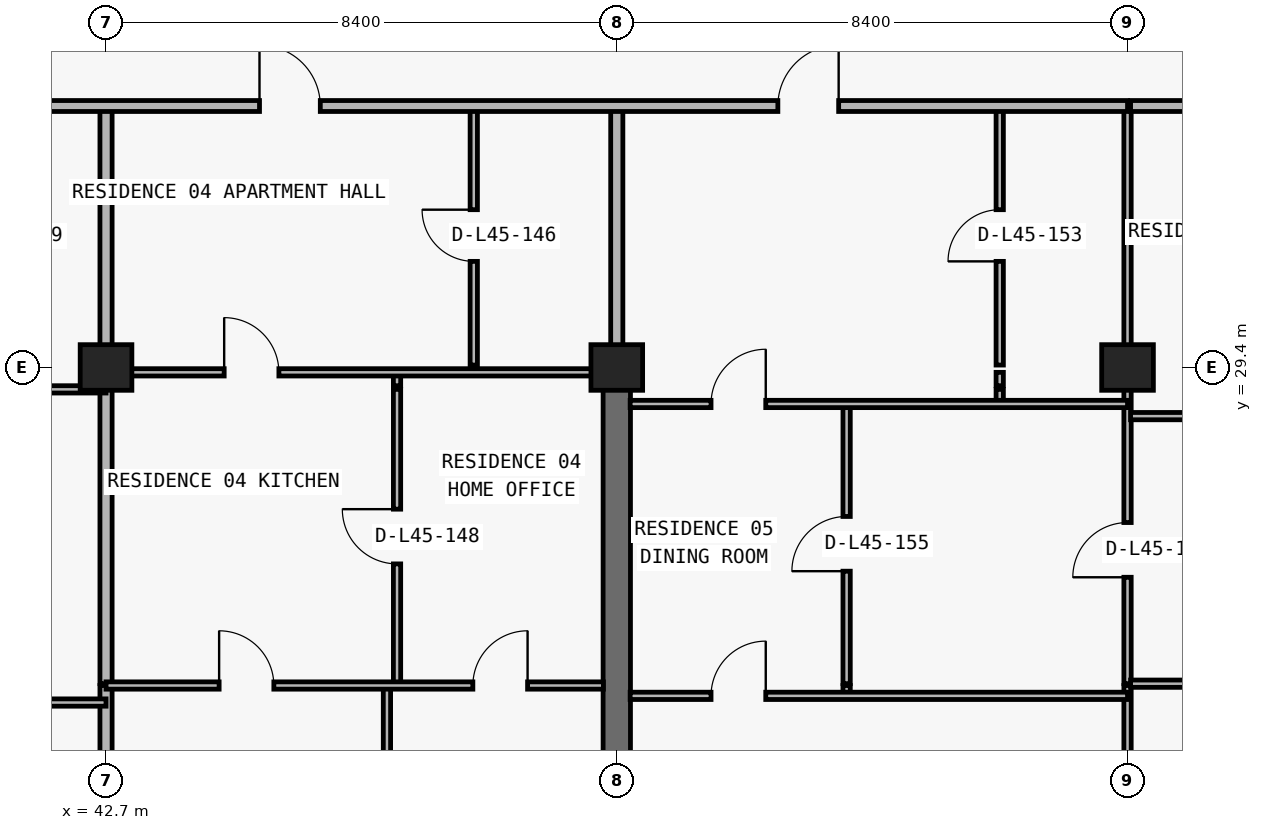
"""IFC4 building model, lengths in metres.
Left out: names, types, materials, properties, quantities, classifications, styles, units other than length and angle.
Written with IfcOpenShell. Run it as: python <this file> out.ifc"""

import sys

from ifc_helpers import new_model, si_unit, direction, frame, frame_2d, origin, origin_2d, place, context, subcontext, project, spatial, rectangle, extrude, element, fill, save


model = new_model("IFC4")
c1 = context("Model", 3, precision=1e-05, world=origin(), true_north=direction((0.0, 1.0)))
c2 = subcontext(c1, "Body", "Model", "MODEL_VIEW")
j1 = project(units=[si_unit("LENGTHUNIT", "METRE"), si_unit("PLANEANGLEUNIT", "RADIAN")], contexts=[c1])
p1 = place(None, origin())
s1 = spatial("IfcSite", under=j1, at=p1, CompositionType="ELEMENT")
p2 = place(p1, origin())
s2 = spatial("IfcBuilding", under=s1, at=p2, CompositionType="ELEMENT")
p3 = place(p2, frame((0.0, 0.0, 163.8)))
s3 = spatial("IfcBuildingStorey", under=s2, at=p3, CompositionType="ELEMENT", Elevation=163.8)
for number, where, z_axis, x_axis in (
    (1, (42.7, 29.4, 0.0), (0.0, 0.0, 1.0), (1.0, 0.0, 0.0)),
    (2, (51.1, 29.4, 0.0), (0.0, 0.0, 1.0), (1.0, 0.0, 0.0)),
    (3, (59.5, 29.4, 0.0), (0.0, 0.0, 1.0), (1.0, 0.0, 0.0)),
):
    element("IfcColumn", number, at=place(p3, frame(where, z_axis=z_axis, x_axis=x_axis)), inside=s3, PredefinedType="COLUMN", context=c2, shape_type="SweptSolid", body=[
        extrude(rectangle(XDim=0.85, YDim=0.75, at=origin_2d()), origin(), (0.0, 0.0, 1.0), 3.05),
    ])
p4 = place(p3, frame((51.1, 20.8, 0.0), z_axis=(0.0, 0.0, 1.0), x_axis=(0.0, 1.0, 0.0)))
e4 = element("IfcWall", 4, at=p4, inside=s3, PredefinedType="SHEAR", context=c2, shape_type="SweptSolid", body=[
    extrude(rectangle(XDim=8.6, YDim=0.45, at=frame_2d((4.3, 0.0))), origin(), (0.0, 0.0, 1.0), 3.05),
])
p5 = place(p3, frame((42.7, 11.24, 0.0), z_axis=(0.0, 0.0, 1.0), x_axis=(0.0, 1.0, 0.0)))
e5 = element("IfcWall", 5, at=p5, inside=s3, PredefinedType="PARTITIONING", context=c2, shape_type="SweptSolid", body=[
    extrude(rectangle(XDim=12.93, YDim=0.2, at=frame_2d((6.465, 0.0))), origin(), (0.0, 0.0, 1.0), 2.263),
])
p6 = place(p3, frame((42.7, 24.2, 0.0), z_axis=(0.0, 0.0, 1.0), x_axis=(0.0, 1.0, 0.0)))
e6 = element("IfcWall", 6, at=p6, inside=s3, PredefinedType="PARTITIONING", context=c2, shape_type="SweptSolid", body=[
    extrude(rectangle(XDim=4.84, YDim=0.2, at=frame_2d((2.42, 0.0))), origin(), (0.0, 0.0, 1.0), 2.263),
])
p7 = place(p3, frame((42.7, 29.1, 0.0), z_axis=(0.0, 0.0, 1.0), x_axis=(0.0, 1.0, 0.0)))
e7 = element("IfcWall", 7, at=p7, inside=s3, PredefinedType="PARTITIONING", context=c2, shape_type="SweptSolid", body=[
    extrude(rectangle(XDim=0.22, YDim=0.2, at=frame_2d((0.11, 0.0))), origin(), (0.0, 0.0, 1.0), 3.05),
])
p8 = place(p3, frame((42.7, 29.44, 0.0), z_axis=(0.0, 0.0, 1.0), x_axis=(0.0, 1.0, 0.0)))
e8 = element("IfcWall", 8, at=p8, inside=s3, PredefinedType="PARTITIONING", context=c2, shape_type="SweptSolid", body=[
    extrude(rectangle(XDim=4.26, YDim=0.2, at=frame_2d((2.13, 0.0))), origin(), (0.0, 0.0, 1.0), 2.263),
])
p9 = place(p3, frame((47.32, 11.24, 0.0), z_axis=(0.0, 0.0, 1.0), x_axis=(0.0, 1.0, 0.0)))
e9 = element("IfcWall", 9, at=p9, inside=s3, PredefinedType="PARTITIONING", context=c2, shape_type="SweptSolid", body=[
    extrude(rectangle(XDim=12.93, YDim=0.12, at=frame_2d((6.465, 0.0))), origin(), (0.0, 0.0, 1.0), 3.05),
])
p10 = place(p3, frame((47.486, 24.2, 0.0), z_axis=(0.0, 0.0, 1.0), x_axis=(0.0, 1.0, 0.0)))
e10 = element("IfcWall", 10, at=p10, inside=s3, PredefinedType="PARTITIONING", context=c2, shape_type="SweptSolid", body=[
    extrude(rectangle(XDim=4.84, YDim=0.12, at=frame_2d((2.42, 0.0))), origin(), (0.0, 0.0, 1.0), 3.05),
])
p11 = place(p10, frame((1.97, 0.0, 0.0)))
e11 = element("IfcOpeningElement", 11, at=p11, cuts=e10, PredefinedType="OPENING", context=c2, shape_type="SweptSolid", body=[
    extrude(rectangle(XDim=0.9, YDim=2.15, at=frame_2d((0.45, 1.075))), frame((0.0, 0.07, 0.0), z_axis=(0.0, -1.0, 0.0), x_axis=(1.0, 0.0, 0.0)), (0.0, 0.0, 1.0), 0.14),
])
p12 = place(p3, frame((47.486, 29.1, 0.0), z_axis=(0.0, 0.0, 1.0), x_axis=(0.0, 1.0, 0.0)))
e12 = element("IfcWall", 12, at=p12, inside=s3, PredefinedType="PARTITIONING", context=c2, shape_type="SweptSolid", body=[
    extrude(rectangle(XDim=0.22, YDim=0.12, at=frame_2d((0.11, 0.0))), origin(), (0.0, 0.0, 1.0), 3.05),
])
p13 = place(p3, frame((48.748, 29.44, 0.0), z_axis=(0.0, 0.0, 1.0), x_axis=(0.0, 1.0, 0.0)))
e13 = element("IfcWall", 13, at=p13, inside=s3, PredefinedType="PARTITIONING", context=c2, shape_type="SweptSolid", body=[
    extrude(rectangle(XDim=4.26, YDim=0.12, at=frame_2d((2.13, 0.0))), origin(), (0.0, 0.0, 1.0), 3.05),
])
p14 = place(p13, frame((1.705, 0.0, 0.0)))
e14 = element("IfcOpeningElement", 14, at=p14, cuts=e13, PredefinedType="OPENING", context=c2, shape_type="SweptSolid", body=[
    extrude(rectangle(XDim=0.85, YDim=2.1, at=frame_2d((0.425, 1.05))), frame((0.0, 0.07, 0.0), z_axis=(0.0, -1.0, 0.0), x_axis=(1.0, 0.0, 0.0)), (0.0, 0.0, 1.0), 0.14),
])
p15 = place(p3, frame((51.1, 29.44, 0.0), z_axis=(0.0, 0.0, 1.0), x_axis=(0.0, 1.0, 0.0)))
e15 = element("IfcWall", 15, at=p15, inside=s3, PredefinedType="PARTITIONING", context=c2, shape_type="SweptSolid", body=[
    extrude(rectangle(XDim=4.26, YDim=0.2, at=frame_2d((2.13, 0.0))), origin(), (0.0, 0.0, 1.0), 2.335),
])
p16 = place(p3, frame((54.88, 24.0, 0.0), z_axis=(0.0, 0.0, 1.0), x_axis=(0.0, 1.0, 0.0)))
e16 = element("IfcWall", 16, at=p16, inside=s3, PredefinedType="PARTITIONING", context=c2, shape_type="SweptSolid", body=[
    extrude(rectangle(XDim=0.17, YDim=0.12, at=frame_2d((0.085, 0.0))), origin(), (0.0, 0.0, 1.0), 3.05),
])
p17 = place(p3, frame((54.88, 24.2, 0.0), z_axis=(0.0, 0.0, 1.0), x_axis=(0.0, 1.0, 0.0)))
e17 = element("IfcWall", 17, at=p17, inside=s3, PredefinedType="PARTITIONING", context=c2, shape_type="SweptSolid", body=[
    extrude(rectangle(XDim=4.6, YDim=0.12, at=frame_2d((2.3, 0.0))), origin(), (0.0, 0.0, 1.0), 3.05),
])
p18 = place(p17, frame((1.85, 0.0, 0.0)))
e18 = element("IfcOpeningElement", 18, at=p18, cuts=e17, PredefinedType="OPENING", context=c2, shape_type="SweptSolid", body=[
    extrude(rectangle(XDim=0.9, YDim=2.15, at=frame_2d((0.45, 1.075))), frame((0.0, 0.07, 0.0), z_axis=(0.0, -1.0, 0.0), x_axis=(1.0, 0.0, 0.0)), (0.0, 0.0, 1.0), 0.14),
])
p19 = place(p3, frame((57.398, 28.8, 0.0), z_axis=(0.0, 0.0, 1.0), x_axis=(0.0, 1.0, 0.0)))
e19 = element("IfcWall", 19, at=p19, inside=s3, PredefinedType="PARTITIONING", context=c2, shape_type="SweptSolid", body=[
    extrude(rectangle(XDim=0.24, YDim=0.12, at=frame_2d((0.12, 0.0))), origin(), (0.0, 0.0, 1.0), 2.725),
])
p20 = place(p3, frame((57.398, 29.1, 0.0), z_axis=(0.0, 0.0, 1.0), x_axis=(0.0, 1.0, 0.0)))
e20 = element("IfcWall", 20, at=p20, inside=s3, PredefinedType="PARTITIONING", context=c2, shape_type="SweptSolid", body=[
    extrude(rectangle(XDim=0.22, YDim=0.12, at=frame_2d((0.11, 0.0))), origin(), (0.0, 0.0, 1.0), 2.725),
])
p21 = place(p3, frame((57.398, 29.44, 0.0), z_axis=(0.0, 0.0, 1.0), x_axis=(0.0, 1.0, 0.0)))
e21 = element("IfcWall", 21, at=p21, inside=s3, PredefinedType="PARTITIONING", context=c2, shape_type="SweptSolid", body=[
    extrude(rectangle(XDim=4.26, YDim=0.12, at=frame_2d((2.13, 0.0))), origin(), (0.0, 0.0, 1.0), 3.05),
])
p22 = place(p21, frame((1.705, 0.0, 0.0)))
e22 = element("IfcOpeningElement", 22, at=p22, cuts=e21, PredefinedType="OPENING", context=c2, shape_type="SweptSolid", body=[
    extrude(rectangle(XDim=0.85, YDim=2.1, at=frame_2d((0.425, 1.05))), frame((0.0, 0.07, 0.0), z_axis=(0.0, -1.0, 0.0), x_axis=(1.0, 0.0, 0.0)), (0.0, 0.0, 1.0), 0.14),
])
p23 = place(p3, frame((59.5, 11.24, 0.0), z_axis=(0.0, 0.0, 1.0), x_axis=(0.0, 1.0, 0.0)))
e23 = element("IfcWall", 23, at=p23, inside=s3, PredefinedType="PARTITIONING", context=c2, shape_type="SweptSolid", body=[
    extrude(rectangle(XDim=12.93, YDim=0.12, at=frame_2d((6.465, 0.0))), origin(), (0.0, 0.0, 1.0), 2.263),
])
p24 = place(p3, frame((59.5, 24.2, 0.0), z_axis=(0.0, 0.0, 1.0), x_axis=(0.0, 1.0, 0.0)))
e24 = element("IfcWall", 24, at=p24, inside=s3, PredefinedType="PARTITIONING", context=c2, shape_type="SweptSolid", body=[
    extrude(rectangle(XDim=4.84, YDim=0.12, at=frame_2d((2.42, 0.0))), origin(), (0.0, 0.0, 1.0), 2.263),
])
p25 = place(p24, frame((1.75, 0.0, 0.0)))
e25 = element("IfcOpeningElement", 25, at=p25, cuts=e24, PredefinedType="OPENING", context=c2, shape_type="SweptSolid", body=[
    extrude(rectangle(XDim=0.9, YDim=2.15, at=frame_2d((0.45, 1.075))), frame((0.0, 0.07, 0.0), z_axis=(0.0, -1.0, 0.0), x_axis=(1.0, 0.0, 0.0)), (0.0, 0.0, 1.0), 0.14),
])
p26 = place(p3, frame((59.5, 29.1, 0.0), z_axis=(0.0, 0.0, 1.0), x_axis=(0.0, 1.0, 0.0)))
e26 = element("IfcWall", 26, at=p26, inside=s3, PredefinedType="PARTITIONING", context=c2, shape_type="SweptSolid", body=[
    extrude(rectangle(XDim=0.22, YDim=0.12, at=frame_2d((0.11, 0.0))), origin(), (0.0, 0.0, 1.0), 3.05),
])
p27 = place(p3, frame((59.5, 29.44, 0.0), z_axis=(0.0, 0.0, 1.0), x_axis=(0.0, 1.0, 0.0)))
e27 = element("IfcWall", 27, at=p27, inside=s3, PredefinedType="PARTITIONING", context=c2, shape_type="SweptSolid", body=[
    extrude(rectangle(XDim=4.26, YDim=0.12, at=frame_2d((2.13, 0.0))), origin(), (0.0, 0.0, 1.0), 2.263),
])
p28 = place(p3, frame((38.75, 23.89, 0.0), z_axis=(0.0, 0.0, 1.0), x_axis=(1.0, 0.0, 0.0)))
e28 = element("IfcWall", 28, at=p28, inside=s3, PredefinedType="PARTITIONING", context=c2, shape_type="SweptSolid", body=[
    extrude(rectangle(XDim=3.95, YDim=0.12, at=frame_2d((1.975, 0.0))), origin(), (0.0, 0.0, 1.0), 3.05),
])
p29 = place(p28, frame((1.752, 0.0, 0.0)))
e29 = element("IfcOpeningElement", 29, at=p29, cuts=e28, PredefinedType="OPENING", context=c2, shape_type="SweptSolid", body=[
    extrude(rectangle(XDim=0.9, YDim=2.15, at=frame_2d((0.45, 1.075))), frame((0.0, 0.07, 0.0), z_axis=(0.0, -1.0, 0.0), x_axis=(1.0, 0.0, 0.0)), (0.0, 0.0, 1.0), 0.14),
])
p30 = place(p3, frame((51.32, 24.0, 0.0), z_axis=(0.0, 0.0, 1.0), x_axis=(1.0, 0.0, 0.0)))
e30 = element("IfcWall", 30, at=p30, inside=s3, PredefinedType="PARTITIONING", context=c2, shape_type="SweptSolid", body=[
    extrude(rectangle(XDim=8.18, YDim=0.12, at=frame_2d((4.09, 0.0))), origin(), (0.0, 0.0, 1.0), 3.05),
])
p31 = place(p30, frame((1.33, 0.0, 0.0)))
e31 = element("IfcOpeningElement", 31, at=p31, cuts=e30, PredefinedType="OPENING", context=c2, shape_type="SweptSolid", body=[
    extrude(rectangle(XDim=0.9, YDim=2.15, at=frame_2d((0.45, 1.075))), frame((0.0, 0.07, 0.0), z_axis=(0.0, -1.0, 0.0), x_axis=(1.0, 0.0, 0.0)), (0.0, 0.0, 1.0), 0.14),
])
p32 = place(p3, frame((42.7, 24.17, 0.0), z_axis=(0.0, 0.0, 1.0), x_axis=(1.0, 0.0, 0.0)))
e32 = element("IfcWall", 32, at=p32, inside=s3, PredefinedType="PARTITIONING", context=c2, shape_type="SweptSolid", body=[
    extrude(rectangle(XDim=8.18, YDim=0.12, at=frame_2d((4.09, 0.0))), origin(), (0.0, 0.0, 1.0), 3.05),
])
p33 = place(p32, frame((1.86, 0.0, 0.0)))
e33 = element("IfcOpeningElement", 33, at=p33, cuts=e32, PredefinedType="OPENING", context=c2, shape_type="SweptSolid", body=[
    extrude(rectangle(XDim=0.9, YDim=2.15, at=frame_2d((0.45, 1.075))), frame((0.0, 0.07, 0.0), z_axis=(0.0, -1.0, 0.0), x_axis=(1.0, 0.0, 0.0)), (0.0, 0.0, 1.0), 0.14),
])
p34 = place(p32, frame((6.033, 0.0, 0.0)))
e34 = element("IfcOpeningElement", 34, at=p34, cuts=e32, PredefinedType="OPENING", context=c2, shape_type="SweptSolid", body=[
    extrude(rectangle(XDim=0.9, YDim=2.15, at=frame_2d((0.45, 1.075))), frame((0.0, 0.07, 0.0), z_axis=(0.0, -1.0, 0.0), x_axis=(1.0, 0.0, 0.0)), (0.0, 0.0, 1.0), 0.14),
])
p35 = place(p3, frame((59.55, 24.2, 0.0), z_axis=(0.0, 0.0, 1.0), x_axis=(1.0, 0.0, 0.0)))
e35 = element("IfcWall", 35, at=p35, inside=s3, PredefinedType="PARTITIONING", context=c2, shape_type="SweptSolid", body=[
    extrude(rectangle(XDim=8.15, YDim=0.12, at=frame_2d((4.075, 0.0))), origin(), (0.0, 0.0, 1.0), 3.05),
])
p36 = place(p35, frame((3.625, 0.0, 0.0)))
e36 = element("IfcOpeningElement", 36, at=p36, cuts=e35, PredefinedType="OPENING", context=c2, shape_type="SweptSolid", body=[
    extrude(rectangle(XDim=0.9, YDim=2.15, at=frame_2d((0.45, 1.075))), frame((0.0, 0.07, 0.0), z_axis=(0.0, -1.0, 0.0), x_axis=(1.0, 0.0, 0.0)), (0.0, 0.0, 1.0), 0.14),
])
p37 = place(p3, frame((59.55, 28.6, 0.0), z_axis=(0.0, 0.0, 1.0), x_axis=(1.0, 0.0, 0.0)))
e37 = element("IfcWall", 37, at=p37, inside=s3, PredefinedType="PARTITIONING", context=c2, shape_type="SweptSolid", body=[
    extrude(rectangle(XDim=8.15, YDim=0.12, at=frame_2d((4.075, 0.0))), origin(), (0.0, 0.0, 1.0), 3.05),
])
p38 = place(p37, frame((2.684, 0.0, 0.0)))
e38 = element("IfcOpeningElement", 38, at=p38, cuts=e37, PredefinedType="OPENING", context=c2, shape_type="SweptSolid", body=[
    extrude(rectangle(XDim=0.9, YDim=2.15, at=frame_2d((0.45, 1.075))), frame((0.0, 0.07, 0.0), z_axis=(0.0, -1.0, 0.0), x_axis=(1.0, 0.0, 0.0)), (0.0, 0.0, 1.0), 0.14),
])
p39 = place(p3, frame((51.32, 28.8, 0.0), z_axis=(0.0, 0.0, 1.0), x_axis=(1.0, 0.0, 0.0)))
e39 = element("IfcWall", 39, at=p39, inside=s3, PredefinedType="PARTITIONING", context=c2, shape_type="SweptSolid", body=[
    extrude(rectangle(XDim=8.18, YDim=0.12, at=frame_2d((4.09, 0.0))), origin(), (0.0, 0.0, 1.0), 3.05),
])
p40 = place(p39, frame((1.33, 0.0, 0.0)))
e40 = element("IfcOpeningElement", 40, at=p40, cuts=e39, PredefinedType="OPENING", context=c2, shape_type="SweptSolid", body=[
    extrude(rectangle(XDim=0.9, YDim=2.15, at=frame_2d((0.45, 1.075))), frame((0.0, 0.07, 0.0), z_axis=(0.0, -1.0, 0.0), x_axis=(1.0, 0.0, 0.0)), (0.0, 0.0, 1.0), 0.14),
])
p41 = place(p3, frame((38.75, 29.04, 0.0), z_axis=(0.0, 0.0, 1.0), x_axis=(1.0, 0.0, 0.0)))
e41 = element("IfcWall", 41, at=p41, inside=s3, PredefinedType="PARTITIONING", context=c2, shape_type="SweptSolid", body=[
    extrude(rectangle(XDim=3.95, YDim=0.12, at=frame_2d((1.975, 0.0))), origin(), (0.0, 0.0, 1.0), 3.05),
])
p42 = place(p3, frame((42.7, 29.32, 0.0), z_axis=(0.0, 0.0, 1.0), x_axis=(1.0, 0.0, 0.0)))
e42 = element("IfcWall", 42, at=p42, inside=s3, PredefinedType="PARTITIONING", context=c2, shape_type="SweptSolid", body=[
    extrude(rectangle(XDim=8.18, YDim=0.12, at=frame_2d((4.09, 0.0))), origin(), (0.0, 0.0, 1.0), 2.263),
])
p43 = place(p42, frame((1.943, 0.0, 0.0)))
e43 = element("IfcOpeningElement", 43, at=p43, cuts=e42, PredefinedType="OPENING", context=c2, shape_type="SweptSolid", body=[
    extrude(rectangle(XDim=0.9, YDim=2.15, at=frame_2d((0.45, 1.075))), frame((0.0, 0.07, 0.0), z_axis=(0.0, -1.0, 0.0), x_axis=(1.0, 0.0, 0.0)), (0.0, 0.0, 1.0), 0.14),
])
p44 = place(p3, frame((38.75, 33.7, 0.0), z_axis=(0.0, 0.0, 1.0), x_axis=(1.0, 0.0, 0.0)))
e44 = element("IfcWall", 44, at=p44, inside=s3, PredefinedType="PARTITIONING", context=c2, shape_type="SweptSolid", body=[
    extrude(rectangle(XDim=20.75, YDim=0.18, at=frame_2d((10.375, 0.0))), origin(), (0.0, 0.0, 1.0), 3.05),
])
p45 = place(p44, frame((6.474, 0.0, 0.0)))
e45 = element("IfcOpeningElement", 45, at=p45, cuts=e44, PredefinedType="OPENING", context=c2, shape_type="SweptSolid", body=[
    extrude(rectangle(XDim=1.0, YDim=2.2, at=frame_2d((0.5, 1.1))), frame((0.0, 0.1, 0.0), z_axis=(0.0, -1.0, 0.0), x_axis=(1.0, 0.0, 0.0)), (0.0, 0.0, 1.0), 0.2),
])
p46 = place(p44, frame((14.999, 0.0, 0.0)))
e46 = element("IfcOpeningElement", 46, at=p46, cuts=e44, PredefinedType="OPENING", context=c2, shape_type="SweptSolid", body=[
    extrude(rectangle(XDim=1.0, YDim=2.2, at=frame_2d((0.5, 1.1))), frame((0.0, 0.1, 0.0), z_axis=(0.0, -1.0, 0.0), x_axis=(1.0, 0.0, 0.0)), (0.0, 0.0, 1.0), 0.2),
])
p47 = place(p3, frame((59.55, 33.7, 0.0), z_axis=(0.0, 0.0, 1.0), x_axis=(1.0, 0.0, 0.0)))
e47 = element("IfcWall", 47, at=p47, inside=s3, PredefinedType="PARTITIONING", context=c2, shape_type="SweptSolid", body=[
    extrude(rectangle(XDim=8.15, YDim=0.18, at=frame_2d((4.075, 0.0))), origin(), (0.0, 0.0, 1.0), 3.05),
])
p48 = place(p45, origin())
e48 = element("IfcDoor", 48, at=p48, inside=s3, OperationType="SINGLE_SWING_LEFT", PredefinedType="DOOR", context=c2, shape_type="SweptSolid", body=[
    extrude(rectangle(XDim=1.0, YDim=2.2, at=frame_2d((0.5, 1.1))), frame((0.0, 0.025, 0.0), z_axis=(0.0, -1.0, 0.0), x_axis=(1.0, 0.0, 0.0)), (0.0, 0.0, 1.0), 0.05),
])
fill(e45, e48)
p49 = place(p14, origin())
e49 = element("IfcDoor", 49, at=p49, inside=s3, OperationType="SINGLE_SWING_RIGHT", PredefinedType="DOOR", context=c2, shape_type="SweptSolid", body=[
    extrude(rectangle(XDim=0.85, YDim=2.1, at=frame_2d((0.425, 1.05))), frame((0.0, 0.025, 0.0), z_axis=(0.0, -1.0, 0.0), x_axis=(1.0, 0.0, 0.0)), (0.0, 0.0, 1.0), 0.05),
])
fill(e14, e49)
p50 = place(p43, origin())
e50 = element("IfcDoor", 50, at=p50, inside=s3, OperationType="SINGLE_SWING_LEFT", PredefinedType="DOOR", context=c2, shape_type="SweptSolid", body=[
    extrude(rectangle(XDim=0.9, YDim=2.15, at=frame_2d((0.45, 1.075))), frame((0.0, 0.025, 0.0), z_axis=(0.0, -1.0, 0.0), x_axis=(1.0, 0.0, 0.0)), (0.0, 0.0, 1.0), 0.05),
])
fill(e43, e50)
p51 = place(p11, origin())
e51 = element("IfcDoor", 51, at=p51, inside=s3, OperationType="SINGLE_SWING_RIGHT", PredefinedType="DOOR", context=c2, shape_type="SweptSolid", body=[
    extrude(rectangle(XDim=0.9, YDim=2.15, at=frame_2d((0.45, 1.075))), frame((0.0, 0.025, 0.0), z_axis=(0.0, -1.0, 0.0), x_axis=(1.0, 0.0, 0.0)), (0.0, 0.0, 1.0), 0.05),
])
fill(e11, e51)
p52 = place(p33, origin())
e52 = element("IfcDoor", 52, at=p52, inside=s3, OperationType="SINGLE_SWING_LEFT", PredefinedType="DOOR", context=c2, shape_type="SweptSolid", body=[
    extrude(rectangle(XDim=0.9, YDim=2.15, at=frame_2d((0.45, 1.075))), frame((0.0, 0.025, 0.0), z_axis=(0.0, -1.0, 0.0), x_axis=(1.0, 0.0, 0.0)), (0.0, 0.0, 1.0), 0.05),
])
fill(e33, e52)
p53 = place(p34, origin())
e53 = element("IfcDoor", 53, at=p53, inside=s3, OperationType="SINGLE_SWING_RIGHT", PredefinedType="DOOR", context=c2, shape_type="SweptSolid", body=[
    extrude(rectangle(XDim=0.9, YDim=2.15, at=frame_2d((0.45, 1.075))), frame((0.0, 0.025, 0.0), z_axis=(0.0, -1.0, 0.0), x_axis=(1.0, 0.0, 0.0)), (0.0, 0.0, 1.0), 0.05),
])
fill(e34, e53)
p54 = place(p46, origin())
e54 = element("IfcDoor", 54, at=p54, inside=s3, OperationType="SINGLE_SWING_RIGHT", PredefinedType="DOOR", context=c2, shape_type="SweptSolid", body=[
    extrude(rectangle(XDim=1.0, YDim=2.2, at=frame_2d((0.5, 1.1))), frame((0.0, 0.025, 0.0), z_axis=(0.0, -1.0, 0.0), x_axis=(1.0, 0.0, 0.0)), (0.0, 0.0, 1.0), 0.05),
])
fill(e46, e54)
p55 = place(p22, origin())
e55 = element("IfcDoor", 55, at=p55, inside=s3, OperationType="SINGLE_SWING_LEFT", PredefinedType="DOOR", context=c2, shape_type="SweptSolid", body=[
    extrude(rectangle(XDim=0.85, YDim=2.1, at=frame_2d((0.425, 1.05))), frame((0.0, 0.025, 0.0), z_axis=(0.0, -1.0, 0.0), x_axis=(1.0, 0.0, 0.0)), (0.0, 0.0, 1.0), 0.05),
])
fill(e22, e55)
p56 = place(p40, origin())
e56 = element("IfcDoor", 56, at=p56, inside=s3, OperationType="SINGLE_SWING_RIGHT", PredefinedType="DOOR", context=c2, shape_type="SweptSolid", body=[
    extrude(rectangle(XDim=0.9, YDim=2.15, at=frame_2d((0.45, 1.075))), frame((0.0, 0.025, 0.0), z_axis=(0.0, -1.0, 0.0), x_axis=(1.0, 0.0, 0.0)), (0.0, 0.0, 1.0), 0.05),
])
fill(e40, e56)
p57 = place(p18, origin())
e57 = element("IfcDoor", 57, at=p57, inside=s3, OperationType="SINGLE_SWING_LEFT", PredefinedType="DOOR", context=c2, shape_type="SweptSolid", body=[
    extrude(rectangle(XDim=0.9, YDim=2.15, at=frame_2d((0.45, 1.075))), frame((0.0, 0.025, 0.0), z_axis=(0.0, -1.0, 0.0), x_axis=(1.0, 0.0, 0.0)), (0.0, 0.0, 1.0), 0.05),
])
fill(e18, e57)
p58 = place(p31, origin())
e58 = element("IfcDoor", 58, at=p58, inside=s3, OperationType="SINGLE_SWING_RIGHT", PredefinedType="DOOR", context=c2, shape_type="SweptSolid", body=[
    extrude(rectangle(XDim=0.9, YDim=2.15, at=frame_2d((0.45, 1.075))), frame((0.0, 0.025, 0.0), z_axis=(0.0, -1.0, 0.0), x_axis=(1.0, 0.0, 0.0)), (0.0, 0.0, 1.0), 0.05),
])
fill(e31, e58)
p59 = place(p25, origin())
e59 = element("IfcDoor", 59, at=p59, inside=s3, OperationType="SINGLE_SWING_LEFT", PredefinedType="DOOR", context=c2, shape_type="SweptSolid", body=[
    extrude(rectangle(XDim=0.9, YDim=2.15, at=frame_2d((0.45, 1.075))), frame((0.0, 0.025, 0.0), z_axis=(0.0, -1.0, 0.0), x_axis=(1.0, 0.0, 0.0)), (0.0, 0.0, 1.0), 0.05),
])
fill(e25, e59)
save(model, sys.argv[1])
